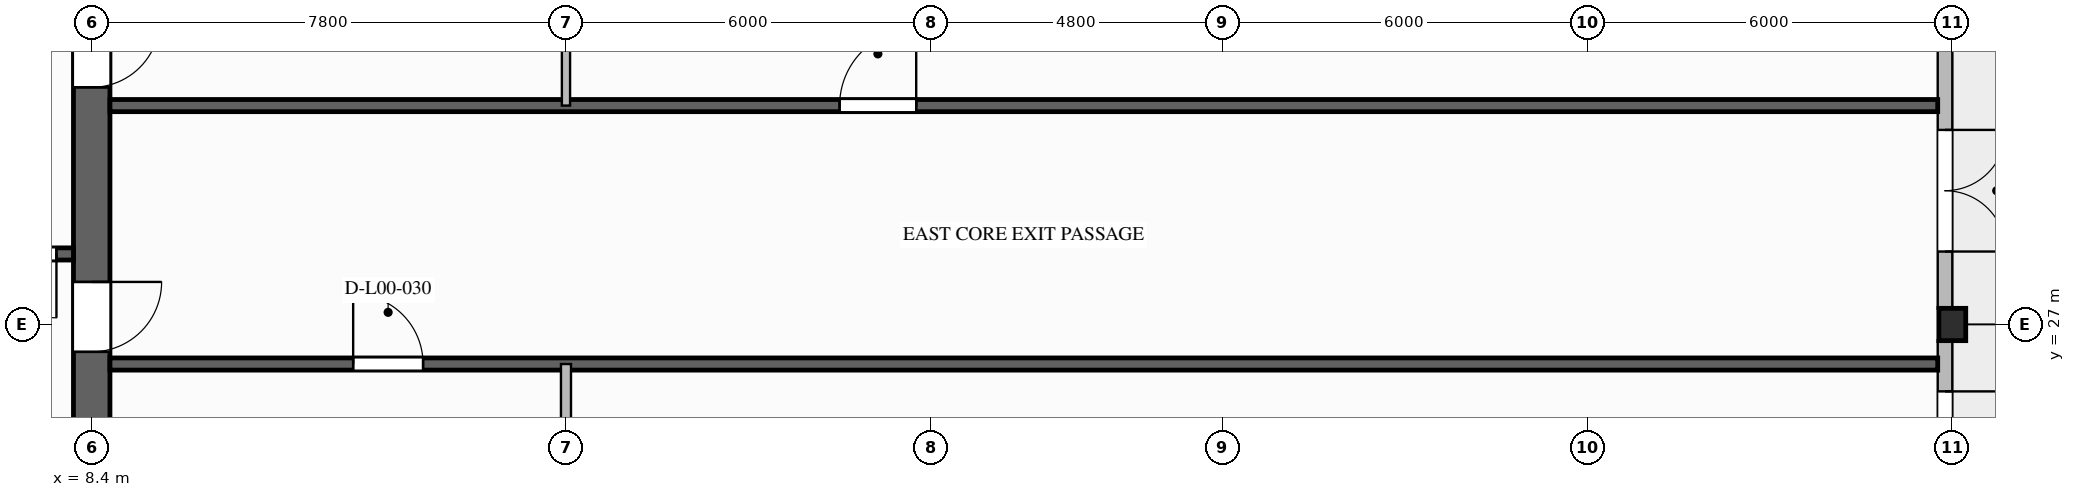
"""IFC4 building model, lengths in metres.
Left out: names, types, materials, properties, quantities, classifications, styles, units other than length and angle.
Written with IfcOpenShell. Run it as: python <this file> out.ifc"""

import sys

from ifc_helpers import new_model, si_unit, direction, frame, frame_2d, origin, origin_2d, place, context, subcontext, project, spatial, rectangle, i_section, extrude, element, fill, save


model = new_model("IFC4")
c1 = context("Model", 3, precision=1e-05, world=origin(), true_north=direction((0.0, 1.0)))
c2 = subcontext(c1, "Body", "Model", "MODEL_VIEW")
j1 = project(units=[si_unit("LENGTHUNIT", "METRE"), si_unit("PLANEANGLEUNIT", "RADIAN")], contexts=[c1])
p1 = place(None, origin())
s1 = spatial("IfcSite", under=j1, at=p1, CompositionType="ELEMENT")
p2 = place(p1, origin())
s2 = spatial("IfcBuilding", under=s1, at=p2, CompositionType="ELEMENT")
p3 = place(p2, origin())
s3 = spatial("IfcBuildingStorey", under=s2, at=p3, CompositionType="ELEMENT", Elevation=0.0)
p4 = place(p3, frame((8.4, 35.1, 0.0), z_axis=(0.0, 0.0, 1.0), x_axis=(0.0, -1.0, 0.0)))
e1 = element("IfcWall", 1, at=p4, inside=s3, PredefinedType="SHEAR", context=c2, shape_type="SweptSolid", body=[
    extrude(rectangle(XDim=16.2, YDim=0.6, at=frame_2d((8.1, 0.0))), origin(), (0.0, 0.0, 1.0), 5.6),
])
p5 = place(p4, frame((7.4, 0.0, 0.0)))
e2 = element("IfcOpeningElement", 2, at=p5, cuts=e1, PredefinedType="OPENING", context=c2, shape_type="SweptSolid", body=[
    extrude(rectangle(XDim=1.15, YDim=2.15, at=frame_2d((0.575, 1.075))), frame((0.0, 0.31, 0.0), z_axis=(0.0, -1.0, 0.0), x_axis=(1.0, 0.0, 0.0)), (0.0, 0.0, 1.0), 0.62),
])
p6 = place(p4, frame((3.08, 0.0, 0.0)))
e3 = element("IfcOpeningElement", 3, at=p6, cuts=e1, PredefinedType="OPENING", context=c2, shape_type="SweptSolid", body=[
    extrude(rectangle(XDim=1.12, YDim=2.1, at=frame_2d((0.56, 1.05))), frame((0.0, 0.31, 0.0), z_axis=(0.0, -1.0, 0.0), x_axis=(1.0, 0.0, 0.0)), (0.0, 0.0, 1.0), 0.62),
])
p7 = place(p4, frame((11.22, 0.0, 0.0)))
e4 = element("IfcOpeningElement", 4, at=p7, cuts=e1, PredefinedType="OPENING", context=c2, shape_type="SweptSolid", body=[
    extrude(rectangle(XDim=1.08, YDim=2.04, at=frame_2d((0.54, 1.02))), frame((0.0, 0.31, 0.0), z_axis=(0.0, -1.0, 0.0), x_axis=(1.0, 0.0, 0.0)), (0.0, 0.0, 1.0), 0.62),
])
p8 = place(p3, frame((39.0, 27.0, 0.0), z_axis=(0.0, 0.0, 1.0), x_axis=(1.0, 0.0, 0.0)))
e5 = element("IfcColumn", 5, at=p8, inside=s3, PredefinedType="COLUMN", context=c2, shape_type="SweptSolid", body=[
    extrude(i_section(OverallWidth=0.442, OverallDepth=0.531, WebThickness=0.066, FlangeThickness=0.106, FilletRadius=0.03, at=origin_2d()), origin(), (0.0, 0.0, 1.0), 5.6),
])
p9 = place(p3, frame((38.88, 26.742, 0.0), z_axis=(0.0, 0.0, 1.0), x_axis=(0.0, -1.0, 0.0)))
e6 = element("IfcWall", 6, at=p9, inside=s3, PredefinedType="STANDARD", context=c2, shape_type="SweptSolid", body=[
    extrude(rectangle(XDim=4.292, YDim=0.24, at=frame_2d((2.146, 0.0))), origin(), (0.0, 0.0, 1.0), 4.604),
])
p10 = place(p9, frame((0.842, 0.0, 0.0)))
e7 = element("IfcOpeningElement", 7, at=p10, cuts=e6, PredefinedType="OPENING", context=c2, shape_type="SweptSolid", body=[
    extrude(rectangle(XDim=2.2, YDim=2.6, at=frame_2d((1.1, 1.3))), frame((0.0, 0.13, 0.0), z_axis=(0.0, -1.0, 0.0), x_axis=(1.0, 0.0, 0.0)), (0.0, 0.0, 1.0), 0.26),
])
p11 = place(p3, frame((38.88, 31.55, 0.0), z_axis=(0.0, 0.0, 1.0), x_axis=(0.0, -1.0, 0.0)))
e8 = element("IfcWall", 8, at=p11, inside=s3, PredefinedType="STANDARD", context=c2, shape_type="SweptSolid", body=[
    extrude(rectangle(XDim=4.292, YDim=0.24, at=frame_2d((2.146, 0.0))), origin(), (0.0, 0.0, 1.0), 4.604),
])
p12 = place(p11, frame((1.35, 0.0, 0.0)))
e9 = element("IfcOpeningElement", 9, at=p12, cuts=e8, PredefinedType="OPENING", context=c2, shape_type="SweptSolid", body=[
    extrude(rectangle(XDim=2.0, YDim=2.4, at=frame_2d((1.0, 1.2))), frame((0.0, 0.13, 0.0), z_axis=(0.0, -1.0, 0.0), x_axis=(1.0, 0.0, 0.0)), (0.0, 0.0, 1.0), 0.26),
])
p13 = place(p3, frame((8.1, 28.16, 0.0), z_axis=(0.0, 0.0, 1.0), x_axis=(-1.0, 0.0, 0.0)))
e10 = element("IfcWall", 10, at=p13, inside=s3, PredefinedType="SOLIDWALL", context=c2, shape_type="SweptSolid", body=[
    extrude(rectangle(XDim=8.1, YDim=0.2, at=frame_2d((4.05, 0.0))), origin(), (0.0, 0.0, 1.0), 5.3),
])
p14 = place(p13, frame((0.28, 0.0, 0.0)))
e11 = element("IfcOpeningElement", 11, at=p14, cuts=e10, PredefinedType="OPENING", context=c2, shape_type="SweptSolid", body=[
    extrude(rectangle(XDim=1.05, YDim=2.1, at=frame_2d((0.525, 1.05))), frame((0.0, 0.11, 0.0), z_axis=(0.0, -1.0, 0.0), x_axis=(1.0, 0.0, 0.0)), (0.0, 0.0, 1.0), 0.22),
])
p15 = place(p3, frame((8.7, 26.35, 0.0), z_axis=(0.0, 0.0, 1.0), x_axis=(1.0, 0.0, 0.0)))
e12 = element("IfcWall", 12, at=p15, inside=s3, PredefinedType="SOLIDWALL", context=c2, shape_type="SweptSolid", body=[
    extrude(rectangle(XDim=30.06, YDim=0.2, at=frame_2d((15.03, 0.0))), origin(), (0.0, 0.0, 1.0), 5.3),
])
p16 = place(p15, frame((4.0, 0.0, 0.0)))
e13 = element("IfcOpeningElement", 13, at=p16, cuts=e12, PredefinedType="OPENING", context=c2, shape_type="SweptSolid", body=[
    extrude(rectangle(XDim=1.15, YDim=2.15, at=frame_2d((0.575, 1.075))), frame((0.0, 0.11, 0.0), z_axis=(0.0, -1.0, 0.0), x_axis=(1.0, 0.0, 0.0)), (0.0, 0.0, 1.0), 0.22),
])
p17 = place(p3, frame((8.7, 30.6, 0.0), z_axis=(0.0, 0.0, 1.0), x_axis=(1.0, 0.0, 0.0)))
e14 = element("IfcWall", 14, at=p17, inside=s3, PredefinedType="SOLIDWALL", context=c2, shape_type="SweptSolid", body=[
    extrude(rectangle(XDim=30.06, YDim=0.2, at=frame_2d((15.03, 0.0))), origin(), (0.0, 0.0, 1.0), 5.3),
])
p18 = place(p17, frame((12.0, 0.0, 0.0)))
e15 = element("IfcOpeningElement", 15, at=p18, cuts=e14, PredefinedType="OPENING", context=c2, shape_type="SweptSolid", body=[
    extrude(rectangle(XDim=1.26, YDim=2.2, at=frame_2d((0.63, 1.1))), frame((0.0, 0.11, 0.0), z_axis=(0.0, -1.0, 0.0), x_axis=(1.0, 0.0, 0.0)), (0.0, 0.0, 1.0), 0.22),
])
p19 = place(p3, frame((16.2, 0.3, 0.0), z_axis=(0.0, 0.0, 1.0), x_axis=(0.0, 1.0, 0.0)))
e16 = element("IfcWall", 16, at=p19, inside=s3, PredefinedType="PARTITIONING", context=c2, shape_type="SweptSolid", body=[
    extrude(rectangle(XDim=26.05, YDim=0.165, at=frame_2d((13.025, 0.0))), origin(), (0.0, 0.0, 1.0), 4.337),
])
p20 = place(p3, frame((16.2, 30.6, 0.0), z_axis=(0.0, 0.0, 1.0), x_axis=(0.0, 1.0, 0.0)))
e17 = element("IfcWall", 17, at=p20, inside=s3, PredefinedType="PARTITIONING", context=c2, shape_type="SweptSolid", body=[
    extrude(rectangle(XDim=13.08, YDim=0.135, at=frame_2d((6.54, 0.0))), origin(), (0.0, 0.0, 1.0), 4.337),
])
p21 = place(p10, origin())
e18 = element("IfcDoor", 18, at=p21, inside=s3, OperationType="DOUBLE_DOOR_SINGLE_SWING", PredefinedType="DOOR", context=c2, shape_type="SweptSolid", body=[
    extrude(rectangle(XDim=2.2, YDim=2.6, at=frame_2d((1.1, 1.3))), frame((0.0, 0.025, 0.0), z_axis=(0.0, -1.0, 0.0), x_axis=(1.0, 0.0, 0.0)), (0.0, 0.0, 1.0), 0.05),
])
fill(e7, e18)
p22 = place(p12, origin())
e19 = element("IfcDoor", 19, at=p22, inside=s3, OperationType="DOUBLE_DOOR_SINGLE_SWING", PredefinedType="DOOR", context=c2, shape_type="SweptSolid", body=[
    extrude(rectangle(XDim=2.0, YDim=2.4, at=frame_2d((1.0, 1.2))), frame((0.0, 0.025, 0.0), z_axis=(0.0, -1.0, 0.0), x_axis=(1.0, 0.0, 0.0)), (0.0, 0.0, 1.0), 0.05),
])
fill(e9, e19)
p23 = place(p14, origin())
e20 = element("IfcDoor", 20, at=p23, inside=s3, OperationType="SINGLE_SWING_LEFT", PredefinedType="DOOR", context=c2, shape_type="SweptSolid", body=[
    extrude(rectangle(XDim=1.05, YDim=2.1, at=frame_2d((0.525, 1.05))), frame((0.0, 0.025, 0.0), z_axis=(0.0, -1.0, 0.0), x_axis=(1.0, 0.0, 0.0)), (0.0, 0.0, 1.0), 0.05),
])
fill(e11, e20)
p24 = place(p5, origin())
e21 = element("IfcDoor", 21, at=p24, inside=s3, OperationType="SINGLE_SWING_LEFT", PredefinedType="DOOR", context=c2, shape_type="SweptSolid", body=[
    extrude(rectangle(XDim=1.15, YDim=2.15, at=frame_2d((0.575, 1.075))), frame((0.0, 0.025, 0.0), z_axis=(0.0, -1.0, 0.0), x_axis=(1.0, 0.0, 0.0)), (0.0, 0.0, 1.0), 0.05),
])
fill(e2, e21)
p25 = place(p6, origin())
e22 = element("IfcDoor", 22, at=p25, inside=s3, OperationType="SINGLE_SWING_LEFT", PredefinedType="DOOR", context=c2, shape_type="SweptSolid", body=[
    extrude(rectangle(XDim=1.12, YDim=2.1, at=frame_2d((0.56, 1.05))), frame((0.0, 0.025, 0.0), z_axis=(0.0, -1.0, 0.0), x_axis=(1.0, 0.0, 0.0)), (0.0, 0.0, 1.0), 0.05),
])
fill(e3, e22)
p26 = place(p16, origin())
e23 = element("IfcDoor", 23, at=p26, inside=s3, OperationType="SINGLE_SWING_LEFT", PredefinedType="DOOR", context=c2, shape_type="SweptSolid", body=[
    extrude(rectangle(XDim=1.15, YDim=2.15, at=frame_2d((0.575, 1.075))), frame((0.0, 0.025, 0.0), z_axis=(0.0, -1.0, 0.0), x_axis=(1.0, 0.0, 0.0)), (0.0, 0.0, 1.0), 0.05),
])
fill(e13, e23)
p27 = place(p18, origin())
e24 = element("IfcDoor", 24, at=p27, inside=s3, OperationType="SINGLE_SWING_RIGHT", PredefinedType="DOOR", context=c2, shape_type="SweptSolid", body=[
    extrude(rectangle(XDim=1.26, YDim=2.2, at=frame_2d((0.63, 1.1))), frame((0.0, 0.025, 0.0), z_axis=(0.0, -1.0, 0.0), x_axis=(1.0, 0.0, 0.0)), (0.0, 0.0, 1.0), 0.05),
])
fill(e15, e24)
save(model, sys.argv[1])
